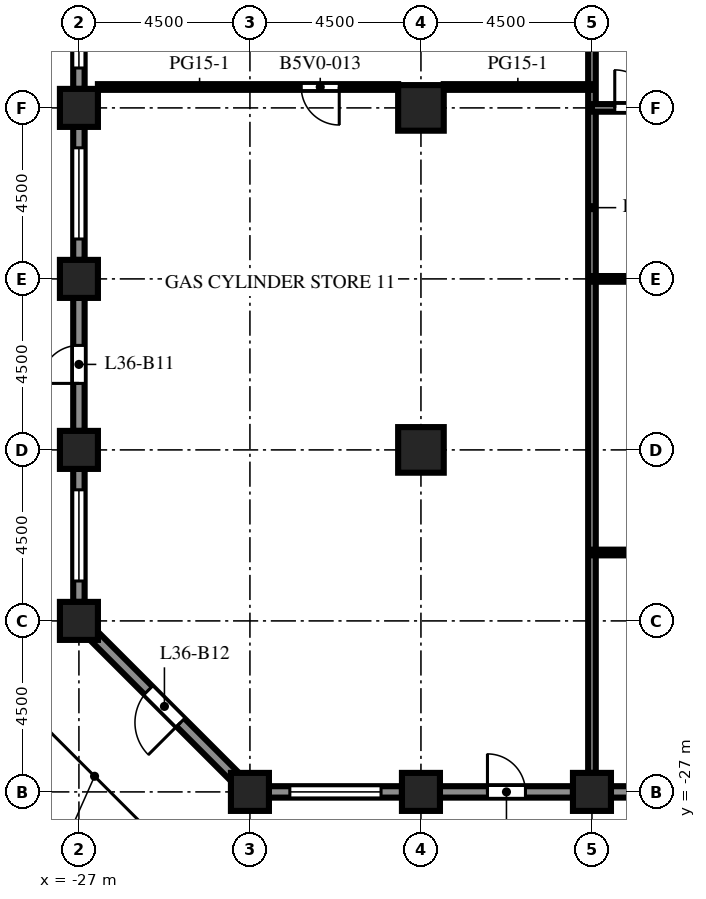
"""IFC4 building model, lengths in metres.
Left out: names, types, materials, properties, quantities, classifications, styles, units other than length and angle.
Written with IfcOpenShell. Run it as: python <this file> out.ifc"""

import sys

from ifc_helpers import new_model, si_unit, direction, frame, frame_2d, origin, origin_2d, place, context, subcontext, project, spatial, rectangle, extrude, element, fill, save


model = new_model("IFC4")
c1 = context("Model", 3, precision=1e-05, world=origin(), true_north=direction((0.0, 1.0)))
c2 = subcontext(c1, "Body", "Model", "MODEL_VIEW")
j1 = project(units=[si_unit("LENGTHUNIT", "METRE"), si_unit("PLANEANGLEUNIT", "RADIAN")], contexts=[c1])
p1 = place(None, origin())
s1 = spatial("IfcSite", under=j1, at=p1, CompositionType="ELEMENT")
p2 = place(p1, origin())
s2 = spatial("IfcBuilding", under=s1, at=p2, CompositionType="ELEMENT")
p3 = place(p2, frame((0.0, 0.0, 160.9)))
s3 = spatial("IfcBuildingStorey", under=s2, at=p3, CompositionType="ELEMENT", Elevation=160.9)
for number, where, z_axis, x_axis in (
    (1, (-27.0, -22.5, 0.0), (0.0, 0.0, 1.0), (1.0, 0.0, 0.0)),
    (2, (-27.0, -18.0, 0.0), (0.0, 0.0, 1.0), (1.0, 0.0, 0.0)),
    (3, (-27.0, -13.5, 0.0), (0.0, 0.0, 1.0), (1.0, 0.0, 0.0)),
    (4, (-27.0, -9.0, 0.0), (0.0, 0.0, 1.0), (1.0, 0.0, 0.0)),
    (5, (-22.5, -27.0, 0.0), (0.0, 0.0, 1.0), (1.0, 0.0, 0.0)),
    (6, (-18.0, -27.0, 0.0), (0.0, 0.0, 1.0), (1.0, 0.0, 0.0)),
    (7, (-13.5, -27.0, 0.0), (0.0, 0.0, 1.0), (1.0, 0.0, 0.0)),
):
    element("IfcColumn", number, at=place(p3, frame(where, z_axis=z_axis, x_axis=x_axis)), inside=s3, PredefinedType="COLUMN", context=c2, shape_type="SweptSolid", body=[
        extrude(rectangle(XDim=1.0, YDim=1.0, at=origin_2d()), origin(), (0.0, 0.0, 1.0), 4.1),
    ])
for number, where, z_axis, x_axis in (
    (8, (-18.0, -18.0, 0.0), (0.0, 0.0, 1.0), (1.0, 0.0, 0.0)),
    (9, (-18.0, -9.0, 0.0), (0.0, 0.0, 1.0), (1.0, 0.0, 0.0)),
):
    element("IfcColumn", number, at=place(p3, frame(where, z_axis=z_axis, x_axis=x_axis)), inside=s3, PredefinedType="COLUMN", context=c2, shape_type="SweptSolid", body=[
        extrude(rectangle(XDim=1.2, YDim=1.2, at=origin_2d()), origin(), (0.0, 0.0, 1.0), 4.1),
    ])
p4 = place(p3, frame((-18.5, -27.0, 0.0), z_axis=(0.0, 0.0, 1.0), x_axis=(-1.0, 0.0, 0.0)))
e10 = element("IfcWall", 10, at=p4, inside=s3, PredefinedType="SOLIDWALL", context=c2, shape_type="SweptSolid", body=[
    extrude(rectangle(XDim=3.5, YDim=0.3, at=frame_2d((1.75, 0.0))), origin(), (0.0, 0.0, 1.0), 2.85),
])
p5 = place(p4, frame((0.55, 0.0, 0.8)))
e11 = element("IfcOpeningElement", 11, at=p5, cuts=e10, PredefinedType="OPENING", context=c2, shape_type="SweptSolid", body=[
    extrude(rectangle(XDim=2.4, YDim=1.7, at=frame_2d((1.2, 0.85))), frame((0.0, 0.16, 0.0), z_axis=(0.0, -1.0, 0.0), x_axis=(1.0, 0.0, 0.0)), (0.0, 0.0, 1.0), 0.32),
])
p6 = place(p3, frame((-14.0, -27.0, 0.0), z_axis=(0.0, 0.0, 1.0), x_axis=(-1.0, 0.0, 0.0)))
e12 = element("IfcWall", 12, at=p6, inside=s3, PredefinedType="SOLIDWALL", context=c2, shape_type="SweptSolid", body=[
    extrude(rectangle(XDim=3.5, YDim=0.3, at=frame_2d((1.75, 0.0))), origin(), (0.0, 0.0, 1.0), 2.85),
])
p7 = place(p6, frame((1.25, 0.0, 0.0)))
e13 = element("IfcOpeningElement", 13, at=p7, cuts=e12, PredefinedType="OPENING", context=c2, shape_type="SweptSolid", body=[
    extrude(rectangle(XDim=1.0, YDim=2.2, at=frame_2d((0.5, 1.1))), frame((0.0, 0.16, 0.0), z_axis=(0.0, -1.0, 0.0), x_axis=(1.0, 0.0, 0.0)), (0.0, 0.0, 1.0), 0.32),
])
p8 = place(p3, frame((-9.5, -27.0, 0.0), z_axis=(0.0, 0.0, 1.0), x_axis=(-1.0, 0.0, 0.0)))
e14 = element("IfcWall", 14, at=p8, inside=s3, PredefinedType="SOLIDWALL", context=c2, shape_type="SweptSolid", body=[
    extrude(rectangle(XDim=3.5, YDim=0.3, at=frame_2d((1.75, 0.0))), origin(), (0.0, 0.0, 1.0), 2.85),
])
p9 = place(p8, frame((0.55, 0.0, 0.8)))
e15 = element("IfcOpeningElement", 15, at=p9, cuts=e14, PredefinedType="OPENING", context=c2, shape_type="SweptSolid", body=[
    extrude(rectangle(XDim=2.4, YDim=1.7, at=frame_2d((1.2, 0.85))), frame((0.0, 0.16, 0.0), z_axis=(0.0, -1.0, 0.0), x_axis=(1.0, 0.0, 0.0)), (0.0, 0.0, 1.0), 0.32),
])
p10 = place(p3, frame((-27.0, -8.5, 0.0), z_axis=(0.0, 0.0, 1.0), x_axis=(0.0, 1.0, 0.0)))
e16 = element("IfcWall", 16, at=p10, inside=s3, PredefinedType="SOLIDWALL", context=c2, shape_type="SweptSolid", body=[
    extrude(rectangle(XDim=3.5, YDim=0.3, at=frame_2d((1.75, 0.0))), origin(), (0.0, 0.0, 1.0), 2.85),
])
p11 = place(p10, frame((0.55, 0.0, 0.8)))
e17 = element("IfcOpeningElement", 17, at=p11, cuts=e16, PredefinedType="OPENING", context=c2, shape_type="SweptSolid", body=[
    extrude(rectangle(XDim=2.4, YDim=1.7, at=frame_2d((1.2, 0.85))), frame((0.0, 0.16, 0.0), z_axis=(0.0, -1.0, 0.0), x_axis=(1.0, 0.0, 0.0)), (0.0, 0.0, 1.0), 0.32),
])
p12 = place(p3, frame((-27.0, -13.0, 0.0), z_axis=(0.0, 0.0, 1.0), x_axis=(0.0, 1.0, 0.0)))
e18 = element("IfcWall", 18, at=p12, inside=s3, PredefinedType="SOLIDWALL", context=c2, shape_type="SweptSolid", body=[
    extrude(rectangle(XDim=3.5, YDim=0.3, at=frame_2d((1.75, 0.0))), origin(), (0.0, 0.0, 1.0), 2.85),
])
p13 = place(p12, frame((0.55, 0.0, 0.8)))
e19 = element("IfcOpeningElement", 19, at=p13, cuts=e18, PredefinedType="OPENING", context=c2, shape_type="SweptSolid", body=[
    extrude(rectangle(XDim=2.4, YDim=1.7, at=frame_2d((1.2, 0.85))), frame((0.0, 0.16, 0.0), z_axis=(0.0, -1.0, 0.0), x_axis=(1.0, 0.0, 0.0)), (0.0, 0.0, 1.0), 0.32),
])
p14 = place(p3, frame((-27.0, -17.5, 0.0), z_axis=(0.0, 0.0, 1.0), x_axis=(0.0, 1.0, 0.0)))
e20 = element("IfcWall", 20, at=p14, inside=s3, PredefinedType="SOLIDWALL", context=c2, shape_type="SweptSolid", body=[
    extrude(rectangle(XDim=3.5, YDim=0.3, at=frame_2d((1.75, 0.0))), origin(), (0.0, 0.0, 1.0), 2.85),
])
p15 = place(p14, frame((1.25, 0.0, 0.0)))
e21 = element("IfcOpeningElement", 21, at=p15, cuts=e20, PredefinedType="OPENING", context=c2, shape_type="SweptSolid", body=[
    extrude(rectangle(XDim=1.0, YDim=2.2, at=frame_2d((0.5, 1.1))), frame((0.0, 0.16, 0.0), z_axis=(0.0, -1.0, 0.0), x_axis=(1.0, 0.0, 0.0)), (0.0, 0.0, 1.0), 0.32),
])
p16 = place(p3, frame((-27.0, -22.0, 0.0), z_axis=(0.0, 0.0, 1.0), x_axis=(0.0, 1.0, 0.0)))
e22 = element("IfcWall", 22, at=p16, inside=s3, PredefinedType="SOLIDWALL", context=c2, shape_type="SweptSolid", body=[
    extrude(rectangle(XDim=3.5, YDim=0.3, at=frame_2d((1.75, 0.0))), origin(), (0.0, 0.0, 1.0), 2.85),
])
p17 = place(p16, frame((0.55, 0.0, 0.8)))
e23 = element("IfcOpeningElement", 23, at=p17, cuts=e22, PredefinedType="OPENING", context=c2, shape_type="SweptSolid", body=[
    extrude(rectangle(XDim=2.4, YDim=1.7, at=frame_2d((1.2, 0.85))), frame((0.0, 0.16, 0.0), z_axis=(0.0, -1.0, 0.0), x_axis=(1.0, 0.0, 0.0)), (0.0, 0.0, 1.0), 0.32),
])
p18 = place(p3, frame((-22.894, -26.606, 0.0), z_axis=(0.0, 0.0, 1.0), x_axis=(-0.707106781187, 0.707106781187, 0.0)))
e24 = element("IfcWall", 24, at=p18, inside=s3, PredefinedType="SOLIDWALL", context=c2, shape_type="SweptSolid", body=[
    extrude(rectangle(XDim=5.25, YDim=0.3, at=frame_2d((2.625, 0.0))), origin(), (0.0, 0.0, 1.0), 2.85),
])
p19 = place(p18, frame((2.025, 0.0, 0.0)))
e25 = element("IfcOpeningElement", 25, at=p19, cuts=e24, PredefinedType="OPENING", context=c2, shape_type="SweptSolid", body=[
    extrude(rectangle(XDim=1.2, YDim=2.2, at=frame_2d((0.6, 1.1))), frame((0.0, 0.16, 0.0), z_axis=(0.0, -1.0, 0.0), x_axis=(1.0, 0.0, 0.0)), (0.0, 0.0, 1.0), 0.32),
])
p20 = place(p3, frame((-13.5, -26.5, 0.0), z_axis=(0.0, 0.0, 1.0), x_axis=(0.0, 1.0, 0.0)))
e26 = element("IfcWall", 26, at=p20, inside=s3, PredefinedType="PARTITIONING", context=c2, shape_type="SweptSolid", body=[
    extrude(rectangle(XDim=29.75, YDim=0.2, at=frame_2d((14.875, 0.0))), origin(), (0.0, 0.0, 1.0), 3.65),
])
p21 = place(p3, frame((21.0, -20.7, 0.0), z_axis=(0.0, 0.0, 1.0), x_axis=(-1.0, 0.0, 0.0)))
e27 = element("IfcWall", 27, at=p21, inside=s3, PredefinedType="PARTITIONING", context=c2, shape_type="SweptSolid", body=[
    extrude(rectangle(XDim=34.5, YDim=0.15, at=frame_2d((17.25, 0.0))), origin(), (0.0, 0.0, 1.0), 3.65),
])
p22 = place(p21, frame((26.15, 0.0, 0.0)))
e28 = element("IfcOpeningElement", 28, at=p22, cuts=e27, PredefinedType="OPENING", context=c2, shape_type="SweptSolid", body=[
    extrude(rectangle(XDim=1.0, YDim=2.1, at=frame_2d((0.5, 1.05))), frame((0.0, 0.085, 0.0), z_axis=(0.0, -1.0, 0.0), x_axis=(1.0, 0.0, 0.0)), (0.0, 0.0, 1.0), 0.17),
])
p23 = place(p21, frame((18.65, 0.0, 0.0)))
e29 = element("IfcOpeningElement", 29, at=p23, cuts=e27, PredefinedType="OPENING", context=c2, shape_type="SweptSolid", body=[
    extrude(rectangle(XDim=1.0, YDim=2.1, at=frame_2d((0.5, 1.05))), frame((0.0, 0.085, 0.0), z_axis=(0.0, -1.0, 0.0), x_axis=(1.0, 0.0, 0.0)), (0.0, 0.0, 1.0), 0.17),
])
p24 = place(p21, frame((10.65, 0.0, 0.0)))
e30 = element("IfcOpeningElement", 30, at=p24, cuts=e27, PredefinedType="OPENING", context=c2, shape_type="SweptSolid", body=[
    extrude(rectangle(XDim=1.0, YDim=2.1, at=frame_2d((0.5, 1.05))), frame((0.0, 0.085, 0.0), z_axis=(0.0, -1.0, 0.0), x_axis=(1.0, 0.0, 0.0)), (0.0, 0.0, 1.0), 0.17),
])
p25 = place(p21, frame((4.15, 0.0, 0.0)))
e31 = element("IfcOpeningElement", 31, at=p25, cuts=e27, PredefinedType="OPENING", context=c2, shape_type="SweptSolid", body=[
    extrude(rectangle(XDim=1.0, YDim=2.1, at=frame_2d((0.5, 1.05))), frame((0.0, 0.085, 0.0), z_axis=(0.0, -1.0, 0.0), x_axis=(1.0, 0.0, 0.0)), (0.0, 0.0, 1.0), 0.17),
])
p26 = place(p3, frame((21.0, -13.5, 0.0), z_axis=(0.0, 0.0, 1.0), x_axis=(-1.0, 0.0, 0.0)))
e32 = element("IfcWall", 32, at=p26, inside=s3, PredefinedType="PARTITIONING", context=c2, shape_type="SweptSolid", body=[
    extrude(rectangle(XDim=34.5, YDim=0.15, at=frame_2d((17.25, 0.0))), origin(), (0.0, 0.0, 1.0), 3.65),
])
p27 = place(p26, frame((26.15, 0.0, 0.0)))
e33 = element("IfcOpeningElement", 33, at=p27, cuts=e32, PredefinedType="OPENING", context=c2, shape_type="SweptSolid", body=[
    extrude(rectangle(XDim=1.0, YDim=2.1, at=frame_2d((0.5, 1.05))), frame((0.0, 0.085, 0.0), z_axis=(0.0, -1.0, 0.0), x_axis=(1.0, 0.0, 0.0)), (0.0, 0.0, 1.0), 0.17),
])
p28 = place(p26, frame((18.65, 0.0, 0.0)))
e34 = element("IfcOpeningElement", 34, at=p28, cuts=e32, PredefinedType="OPENING", context=c2, shape_type="SweptSolid", body=[
    extrude(rectangle(XDim=1.0, YDim=2.1, at=frame_2d((0.5, 1.05))), frame((0.0, 0.085, 0.0), z_axis=(0.0, -1.0, 0.0), x_axis=(1.0, 0.0, 0.0)), (0.0, 0.0, 1.0), 0.17),
])
p29 = place(p26, frame((11.4, 0.0, 0.0)))
e35 = element("IfcOpeningElement", 35, at=p29, cuts=e32, PredefinedType="OPENING", context=c2, shape_type="SweptSolid", body=[
    extrude(rectangle(XDim=1.0, YDim=2.1, at=frame_2d((0.5, 1.05))), frame((0.0, 0.085, 0.0), z_axis=(0.0, -1.0, 0.0), x_axis=(1.0, 0.0, 0.0)), (0.0, 0.0, 1.0), 0.17),
])
p30 = place(p26, frame((3.15, 0.0, 0.0)))
e36 = element("IfcOpeningElement", 36, at=p30, cuts=e32, PredefinedType="OPENING", context=c2, shape_type="SweptSolid", body=[
    extrude(rectangle(XDim=1.0, YDim=2.1, at=frame_2d((0.5, 1.05))), frame((0.0, 0.085, 0.0), z_axis=(0.0, -1.0, 0.0), x_axis=(1.0, 0.0, 0.0)), (0.0, 0.0, 1.0), 0.17),
])
p31 = place(p3, frame((-10.5, -9.0, 0.0), z_axis=(0.0, 0.0, 1.0), x_axis=(-1.0, 0.0, 0.0)))
e37 = element("IfcWall", 37, at=p31, inside=s3, PredefinedType="PARTITIONING", context=c2, shape_type="SweptSolid", body=[
    extrude(rectangle(XDim=3.0, YDim=0.2, at=frame_2d((1.5, 0.0))), origin(), (0.0, 0.0, 1.0), 3.65),
])
p32 = place(p31, frame((1.4, 0.0, 0.0)))
e38 = element("IfcOpeningElement", 38, at=p32, cuts=e37, PredefinedType="OPENING", context=c2, shape_type="SweptSolid", body=[
    extrude(rectangle(XDim=1.0, YDim=2.1, at=frame_2d((0.5, 1.05))), frame((0.0, 0.11, 0.0), z_axis=(0.0, -1.0, 0.0), x_axis=(1.0, 0.0, 0.0)), (0.0, 0.0, 1.0), 0.22),
])
p33 = place(p3, frame((-18.6, -8.45, 0.0), z_axis=(0.0, 0.0, 1.0), x_axis=(-1.0, 0.0, 0.0)))
e39 = element("IfcWall", 39, at=p33, inside=s3, PredefinedType="PARTITIONING", context=c2, shape_type="SweptSolid", body=[
    extrude(rectangle(XDim=7.9, YDim=0.15, at=frame_2d((3.95, 0.0))), origin(), (0.0, 0.0, 1.0), 3.65),
])
p34 = place(p33, frame((1.55, 0.0, 0.0)))
e40 = element("IfcOpeningElement", 40, at=p34, cuts=e39, PredefinedType="OPENING", context=c2, shape_type="SweptSolid", body=[
    extrude(rectangle(XDim=1.0, YDim=2.1, at=frame_2d((0.5, 1.05))), frame((0.0, 0.085, 0.0), z_axis=(0.0, -1.0, 0.0), x_axis=(1.0, 0.0, 0.0)), (0.0, 0.0, 1.0), 0.17),
])
p35 = place(p3, frame((-17.4, -8.45, 0.0), z_axis=(0.0, 0.0, 1.0), x_axis=(1.0, 0.0, 0.0)))
e41 = element("IfcWall", 41, at=p35, inside=s3, PredefinedType="PARTITIONING", context=c2, shape_type="SweptSolid", body=[
    extrude(rectangle(XDim=3.9, YDim=0.15, at=frame_2d((1.95, 0.0))), origin(), (0.0, 0.0, 1.0), 3.65),
])
p36 = place(p5, origin())
e42 = element("IfcWindow", 42, at=p36, inside=s3, PartitioningType="SINGLE_PANEL", PredefinedType="WINDOW", context=c2, shape_type="SweptSolid", body=[
    extrude(rectangle(XDim=2.4, YDim=1.7, at=frame_2d((1.2, 0.85))), frame((0.0, 0.03, 0.0), z_axis=(0.0, -1.0, 0.0), x_axis=(1.0, 0.0, 0.0)), (0.0, 0.0, 1.0), 0.06),
])
fill(e11, e42)
p37 = place(p7, origin())
e43 = element("IfcDoor", 43, at=p37, inside=s3, OperationType="SINGLE_SWING_RIGHT", PredefinedType="DOOR", context=c2, shape_type="SweptSolid", body=[
    extrude(rectangle(XDim=1.0, YDim=2.2, at=frame_2d((0.5, 1.1))), frame((0.0, 0.025, 0.0), z_axis=(0.0, -1.0, 0.0), x_axis=(1.0, 0.0, 0.0)), (0.0, 0.0, 1.0), 0.05),
])
fill(e13, e43)
p38 = place(p11, origin())
e44 = element("IfcWindow", 44, at=p38, inside=s3, PartitioningType="SINGLE_PANEL", PredefinedType="WINDOW", context=c2, shape_type="SweptSolid", body=[
    extrude(rectangle(XDim=2.4, YDim=1.7, at=frame_2d((1.2, 0.85))), frame((0.0, 0.03, 0.0), z_axis=(0.0, -1.0, 0.0), x_axis=(1.0, 0.0, 0.0)), (0.0, 0.0, 1.0), 0.06),
])
fill(e17, e44)
p39 = place(p13, origin())
e45 = element("IfcWindow", 45, at=p39, inside=s3, PartitioningType="SINGLE_PANEL", PredefinedType="WINDOW", context=c2, shape_type="SweptSolid", body=[
    extrude(rectangle(XDim=2.4, YDim=1.7, at=frame_2d((1.2, 0.85))), frame((0.0, 0.03, 0.0), z_axis=(0.0, -1.0, 0.0), x_axis=(1.0, 0.0, 0.0)), (0.0, 0.0, 1.0), 0.06),
])
fill(e19, e45)
p40 = place(p15, origin())
e46 = element("IfcDoor", 46, at=p40, inside=s3, OperationType="SINGLE_SWING_LEFT", PredefinedType="DOOR", context=c2, shape_type="SweptSolid", body=[
    extrude(rectangle(XDim=1.0, YDim=2.2, at=frame_2d((0.5, 1.1))), frame((0.0, 0.025, 0.0), z_axis=(0.0, -1.0, 0.0), x_axis=(1.0, 0.0, 0.0)), (0.0, 0.0, 1.0), 0.05),
])
fill(e21, e46)
p41 = place(p17, origin())
e47 = element("IfcWindow", 47, at=p41, inside=s3, PartitioningType="SINGLE_PANEL", PredefinedType="WINDOW", context=c2, shape_type="SweptSolid", body=[
    extrude(rectangle(XDim=2.4, YDim=1.7, at=frame_2d((1.2, 0.85))), frame((0.0, 0.03, 0.0), z_axis=(0.0, -1.0, 0.0), x_axis=(1.0, 0.0, 0.0)), (0.0, 0.0, 1.0), 0.06),
])
fill(e23, e47)
p42 = place(p19, origin())
e48 = element("IfcDoor", 48, at=p42, inside=s3, OperationType="SINGLE_SWING_LEFT", PredefinedType="DOOR", context=c2, shape_type="SweptSolid", body=[
    extrude(rectangle(XDim=1.2, YDim=2.2, at=frame_2d((0.6, 1.1))), frame((0.0, 0.025, 0.0), z_axis=(0.0, -1.0, 0.0), x_axis=(1.0, 0.0, 0.0)), (0.0, 0.0, 1.0), 0.05),
])
fill(e25, e48)
p43 = place(p32, origin())
e49 = element("IfcDoor", 49, at=p43, inside=s3, OperationType="SINGLE_SWING_RIGHT", PredefinedType="DOOR", context=c2, shape_type="SweptSolid", body=[
    extrude(rectangle(XDim=1.0, YDim=2.1, at=frame_2d((0.5, 1.05))), frame((0.0, 0.025, 0.0), z_axis=(0.0, -1.0, 0.0), x_axis=(1.0, 0.0, 0.0)), (0.0, 0.0, 1.0), 0.05),
])
fill(e38, e49)
p44 = place(p34, origin())
e50 = element("IfcDoor", 50, at=p44, inside=s3, OperationType="SINGLE_SWING_LEFT", PredefinedType="DOOR", context=c2, shape_type="SweptSolid", body=[
    extrude(rectangle(XDim=1.0, YDim=2.1, at=frame_2d((0.5, 1.05))), frame((0.0, 0.025, 0.0), z_axis=(0.0, -1.0, 0.0), x_axis=(1.0, 0.0, 0.0)), (0.0, 0.0, 1.0), 0.05),
])
fill(e40, e50)
save(model, sys.argv[1])
